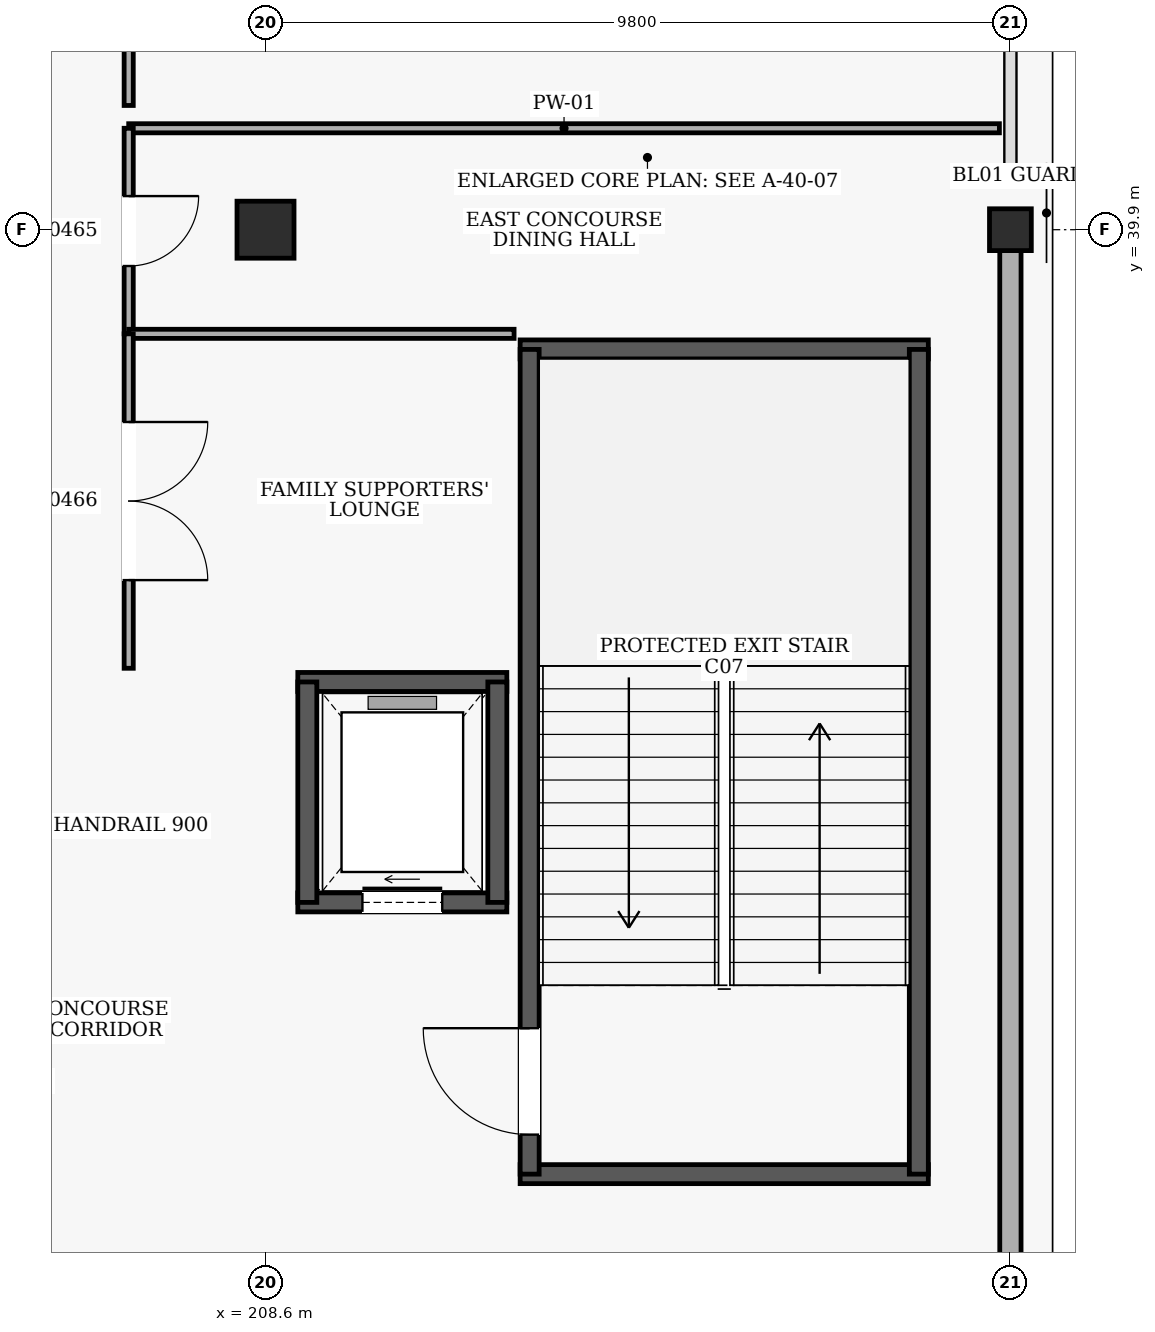
"""IFC4 building model, lengths in metres.
Left out: names, types, materials, properties, quantities, classifications, styles, units other than length and angle.
Written with IfcOpenShell. Run it as: python <this file> out.ifc"""

import sys

from ifc_helpers import new_model, si_unit, direction, frame, frame_2d, origin, origin_2d, place, context, subcontext, project, spatial, rectangle, extrude, element, fill, save


model = new_model("IFC4")
c1 = context("Model", 3, precision=1e-05, world=origin(), true_north=direction((0.0, 1.0)))
c2 = subcontext(c1, "Body", "Model", "MODEL_VIEW")
j1 = project(units=[si_unit("LENGTHUNIT", "METRE"), si_unit("PLANEANGLEUNIT", "RADIAN")], contexts=[c1])
p1 = place(None, origin())
s1 = spatial("IfcSite", under=j1, at=p1, CompositionType="ELEMENT")
p2 = place(p1, origin())
s2 = spatial("IfcBuilding", under=s1, at=p2, CompositionType="ELEMENT")
p3 = place(p2, frame((0.0, 0.0, 5.4)))
s3 = spatial("IfcBuildingStorey", under=s2, at=p3, CompositionType="ELEMENT", Elevation=5.4)
p4 = place(p3, frame((208.6, 39.9, 0.0), z_axis=(0.0, 0.0, 1.0), x_axis=(1.0, 0.0, 0.0)))
e1 = element("IfcColumn", 1, at=p4, inside=s3, PredefinedType="COLUMN", context=c2, shape_type="SweptSolid", body=[
    extrude(rectangle(XDim=0.75, YDim=0.75, at=origin_2d()), origin(), (0.0, 0.0, 1.0), 4.8),
])
p5 = place(p3, frame((218.4, 39.9, 0.0), z_axis=(0.0, 0.0, 1.0), x_axis=(1.0, 0.0, 0.0)))
e2 = element("IfcColumn", 2, at=p5, inside=s3, PredefinedType="COLUMN", context=c2, shape_type="SweptSolid", body=[
    extrude(rectangle(XDim=0.55, YDim=0.55, at=origin_2d()), origin(), (0.0, 0.0, 1.0), 4.8),
])
p6 = place(p3, frame((218.4, 39.63, 0.0), z_axis=(0.0, 0.0, 1.0), x_axis=(0.0, -1.0, 0.0)))
e3 = element("IfcWall", 3, at=p6, inside=s3, PredefinedType="SOLIDWALL", context=c2, shape_type="SweptSolid", body=[
    extrude(rectangle(XDim=13.86, YDim=0.28, at=frame_2d((6.93, 0.0))), origin(), (0.0, 0.0, 1.0), 3.58),
])
for number, where, z_axis, x_axis in (
    (4, (211.95, 27.475, 0.0), (0.0, 0.0, 1.0), (1.0, 0.0, 0.0)),
    (5, (217.32, 38.325, 0.0), (0.0, 0.0, 1.0), (-1.0, 0.0, 0.0)),
):
    element("IfcWall", number, at=place(p3, frame(where, z_axis=z_axis, x_axis=x_axis)), inside=s3, PredefinedType="SHEAR", context=c2, shape_type="SweptSolid", body=[
        extrude(rectangle(XDim=5.37, YDim=0.25, at=frame_2d((2.685, 0.0))), origin(), (0.0, 0.0, 1.0), 4.5),
    ])
p7 = place(p3, frame((212.075, 27.475, 0.0), z_axis=(0.0, 0.0, 1.0), x_axis=(0.0, 1.0, 0.0)))
e6 = element("IfcWall", 6, at=p7, inside=s3, PredefinedType="SHEAR", context=c2, shape_type="SweptSolid", body=[
    extrude(rectangle(XDim=10.85, YDim=0.25, at=frame_2d((5.425, 0.0))), origin(), (0.0, 0.0, 1.0), 4.5),
])
p8 = place(p7, frame((0.52, 0.0, 0.0)))
e7 = element("IfcOpeningElement", 7, at=p8, cuts=e6, PredefinedType="OPENING", context=c2, shape_type="SweptSolid", body=[
    extrude(rectangle(XDim=1.4, YDim=2.15, at=frame_2d((0.7, 1.075))), frame((0.0, 0.135, 0.0), z_axis=(0.0, -1.0, 0.0), x_axis=(1.0, 0.0, 0.0)), (0.0, 0.0, 1.0), 0.27),
])
p9 = place(p3, frame((217.195, 27.475, 0.0), z_axis=(0.0, 0.0, 1.0), x_axis=(0.0, 1.0, 0.0)))
e8 = element("IfcWall", 8, at=p9, inside=s3, PredefinedType="SHEAR", context=c2, shape_type="SweptSolid", body=[
    extrude(rectangle(XDim=10.85, YDim=0.25, at=frame_2d((5.425, 0.0))), origin(), (0.0, 0.0, 1.0), 4.5),
])
p10 = place(p3, frame((209.025, 31.05, 0.0), z_axis=(0.0, 0.0, 1.0), x_axis=(1.0, 0.0, 0.0)))
e9 = element("IfcWall", 9, at=p10, inside=s3, PredefinedType="SHEAR", context=c2, shape_type="SweptSolid", body=[
    extrude(rectangle(XDim=2.75, YDim=0.25, at=frame_2d((1.375, 0.0))), origin(), (0.0, 0.0, 1.0), 4.5),
])
p11 = place(p10, frame((0.85, 0.0, 0.0)))
e10 = element("IfcOpeningElement", 10, at=p11, cuts=e9, PredefinedType="OPENING", context=c2, shape_type="SweptSolid", body=[
    extrude(rectangle(XDim=1.05, YDim=2.15, at=frame_2d((0.525, 1.075))), frame((0.0, 0.135, 0.0), z_axis=(0.0, -1.0, 0.0), x_axis=(1.0, 0.0, 0.0)), (0.0, 0.0, 1.0), 0.27),
])
p12 = place(p3, frame((211.775, 33.95, 0.0), z_axis=(0.0, 0.0, 1.0), x_axis=(-1.0, 0.0, 0.0)))
e11 = element("IfcWall", 11, at=p12, inside=s3, PredefinedType="SHEAR", context=c2, shape_type="SweptSolid", body=[
    extrude(rectangle(XDim=2.75, YDim=0.25, at=frame_2d((1.375, 0.0))), origin(), (0.0, 0.0, 1.0), 4.5),
])
for number, where, z_axis, x_axis in (
    (12, (209.15, 33.95, 0.0), (0.0, 0.0, 1.0), (0.0, -1.0, 0.0)),
    (13, (211.65, 31.05, 0.0), (0.0, 0.0, 1.0), (0.0, 1.0, 0.0)),
):
    element("IfcWall", number, at=place(p3, frame(where, z_axis=z_axis, x_axis=x_axis)), inside=s3, PredefinedType="SHEAR", context=c2, shape_type="SweptSolid", body=[
        extrude(rectangle(XDim=2.9, YDim=0.25, at=frame_2d((1.45, 0.0))), origin(), (0.0, 0.0, 1.0), 4.5),
    ])
p13 = place(p3, frame((218.255, 41.234, 0.0), z_axis=(0.0, 0.0, 1.0), x_axis=(-1.0, 0.0, 0.0)))
e14 = element("IfcWall", 14, at=p13, inside=s3, PredefinedType="PARTITIONING", context=c2, shape_type="SweptSolid", body=[
    extrude(rectangle(XDim=11.455, YDim=0.12, at=frame_2d((5.728, 0.0))), origin(), (0.0, 0.0, 1.0), 4.5),
])
p14 = place(p3, frame((206.8, 41.234, 0.0), z_axis=(0.0, 0.0, 1.0), x_axis=(0.0, -1.0, 0.0)))
e15 = element("IfcWall", 15, at=p14, inside=s3, PredefinedType="PARTITIONING", context=c2, shape_type="SweptSolid", body=[
    extrude(rectangle(XDim=2.704, YDim=0.12, at=frame_2d((1.352, 0.0))), origin(), (0.0, 0.0, 1.0), 4.5),
])
p15 = place(p14, frame((0.892, 0.0, 0.0)))
e16 = element("IfcOpeningElement", 16, at=p15, cuts=e15, PredefinedType="OPENING", context=c2, shape_type="SweptSolid", body=[
    extrude(rectangle(XDim=0.92, YDim=2.1, at=frame_2d((0.46, 1.05))), frame((0.0, 0.07, 0.0), z_axis=(0.0, -1.0, 0.0), x_axis=(1.0, 0.0, 0.0)), (0.0, 0.0, 1.0), 0.14),
])
p16 = place(p3, frame((211.87, 38.53, 0.0), z_axis=(0.0, 0.0, 1.0), x_axis=(-1.0, 0.0, 0.0)))
e17 = element("IfcWall", 17, at=p16, inside=s3, PredefinedType="PARTITIONING", context=c2, shape_type="SweptSolid", body=[
    extrude(rectangle(XDim=5.07, YDim=0.12, at=frame_2d((2.535, 0.0))), origin(), (0.0, 0.0, 1.0), 4.5),
])
p17 = place(p3, frame((206.8, 38.53, 0.0), z_axis=(0.0, 0.0, 1.0), x_axis=(0.0, -1.0, 0.0)))
e18 = element("IfcWall", 18, at=p17, inside=s3, PredefinedType="PARTITIONING", context=c2, shape_type="SweptSolid", body=[
    extrude(rectangle(XDim=4.4, YDim=0.12, at=frame_2d((2.2, 0.0))), origin(), (0.0, 0.0, 1.0), 4.5),
])
p18 = place(p17, frame((1.16, 0.0, 0.0)))
e19 = element("IfcOpeningElement", 19, at=p18, cuts=e18, PredefinedType="OPENING", context=c2, shape_type="SweptSolid", body=[
    extrude(rectangle(XDim=2.08, YDim=2.35, at=frame_2d((1.04, 1.175))), frame((0.0, 0.07, 0.0), z_axis=(0.0, -1.0, 0.0), x_axis=(1.0, 0.0, 0.0)), (0.0, 0.0, 1.0), 0.14),
])
p19 = place(p3, frame((206.8, 54.03, 0.0), z_axis=(0.0, 0.0, 1.0), x_axis=(0.0, -1.0, 0.0)))
e20 = element("IfcWall", 20, at=p19, inside=s3, PredefinedType="PARTITIONING", context=c2, shape_type="SweptSolid", body=[
    extrude(rectangle(XDim=12.496, YDim=0.12, at=frame_2d((6.248, 0.0))), origin(), (0.0, 0.0, 1.0), 4.5),
])
p20 = place(p19, frame((3.626, 0.0, 0.0)))
e21 = element("IfcOpeningElement", 21, at=p20, cuts=e20, PredefinedType="OPENING", context=c2, shape_type="SweptSolid", body=[
    extrude(rectangle(XDim=2.16, YDim=2.35, at=frame_2d((1.08, 1.175))), frame((0.0, 0.07, 0.0), z_axis=(0.0, -1.0, 0.0), x_axis=(1.0, 0.0, 0.0)), (0.0, 0.0, 1.0), 0.14),
])
p21 = place(p8, frame((1.4, 0.0, 0.0), z_axis=(0.0, 0.0, 1.0), x_axis=(-1.0, 0.0, 0.0)))
e22 = element("IfcDoor", 22, at=p21, inside=s3, OperationType="SINGLE_SWING_LEFT", PredefinedType="DOOR", context=c2, shape_type="SweptSolid", body=[
    extrude(rectangle(XDim=1.4, YDim=2.15, at=frame_2d((0.7, 1.075))), frame((0.0, 0.025, 0.0), z_axis=(0.0, -1.0, 0.0), x_axis=(1.0, 0.0, 0.0)), (0.0, 0.0, 1.0), 0.05),
])
fill(e7, e22)
p22 = place(p11, origin())
e23 = element("IfcDoor", 23, at=p22, inside=s3, OperationType="SLIDING_TO_RIGHT", PredefinedType="DOOR", context=c2, shape_type="SweptSolid", body=[
    extrude(rectangle(XDim=1.05, YDim=2.15, at=frame_2d((0.525, 1.075))), frame((0.0, 0.025, 0.0), z_axis=(0.0, -1.0, 0.0), x_axis=(1.0, 0.0, 0.0)), (0.0, 0.0, 1.0), 0.05),
])
fill(e10, e23)
p23 = place(p15, origin())
e24 = element("IfcDoor", 24, at=p23, inside=s3, OperationType="SINGLE_SWING_LEFT", PredefinedType="DOOR", context=c2, shape_type="SweptSolid", body=[
    extrude(rectangle(XDim=0.92, YDim=2.1, at=frame_2d((0.46, 1.05))), frame((0.0, 0.025, 0.0), z_axis=(0.0, -1.0, 0.0), x_axis=(1.0, 0.0, 0.0)), (0.0, 0.0, 1.0), 0.05),
])
fill(e16, e24)
p24 = place(p18, origin())
e25 = element("IfcDoor", 25, at=p24, inside=s3, OperationType="DOUBLE_DOOR_SINGLE_SWING", PredefinedType="DOOR", context=c2, shape_type="SweptSolid", body=[
    extrude(rectangle(XDim=2.08, YDim=2.35, at=frame_2d((1.04, 1.175))), frame((0.0, 0.025, 0.0), z_axis=(0.0, -1.0, 0.0), x_axis=(1.0, 0.0, 0.0)), (0.0, 0.0, 1.0), 0.05),
])
fill(e19, e25)
save(model, sys.argv[1])
